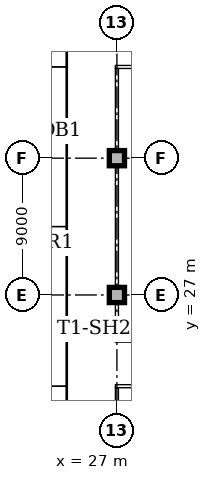
"""IFC4 building model, lengths in metres.
Left out: names, types, materials, properties, quantities, classifications, styles, units other than length and angle.
Written with IfcOpenShell. Run it as: python <this file> out.ifc"""

import sys

from ifc_helpers import new_model, si_unit, direction, frame, frame_2d, origin, origin_2d, place, context, subcontext, project, spatial, rectangle, extrude, element, fill, save


model = new_model("IFC4")
c1 = context("Model", 3, precision=1e-05, world=origin(), true_north=direction((0.0, 1.0)))
c2 = subcontext(c1, "Body", "Model", "MODEL_VIEW")
j1 = project(units=[si_unit("LENGTHUNIT", "METRE"), si_unit("PLANEANGLEUNIT", "RADIAN")], contexts=[c1])
p1 = place(None, origin())
s1 = spatial("IfcSite", under=j1, at=p1, CompositionType="ELEMENT")
p2 = place(p1, origin())
s2 = spatial("IfcBuilding", under=s1, at=p2, CompositionType="ELEMENT")
p3 = place(p2, origin())
s3 = spatial("IfcBuildingStorey", under=s2, at=p3, CompositionType="ELEMENT", Elevation=0.0)
for number, where, z_axis, x_axis in (
    (1, (3.9, 20.4, 0.0), (0.0, 0.0, 1.0), (1.0, 0.0, 0.0)),
    (2, (23.7, 42.6, 0.0), (0.0, 0.0, 1.0), (-1.0, 0.0, 0.0)),
):
    element("IfcWall", number, at=place(p3, frame(where, z_axis=z_axis, x_axis=x_axis)), inside=s3, PredefinedType="SOLIDWALL", context=c2, shape_type="SweptSolid", body=[
        extrude(rectangle(XDim=19.8, YDim=1.2, at=frame_2d((9.9, 0.0))), origin(), (0.0, 0.0, 1.0), 6.0),
    ])
p4 = place(p3, frame((23.1, 21.0, 0.0), z_axis=(0.0, 0.0, 1.0), x_axis=(0.0, 1.0, 0.0)))
e3 = element("IfcWall", 3, at=p4, inside=s3, PredefinedType="SOLIDWALL", context=c2, shape_type="SweptSolid", body=[
    extrude(rectangle(XDim=10.5, YDim=1.2, at=frame_2d((5.25, 0.0))), origin(), (0.0, 0.0, 1.0), 6.0),
])
p5 = place(p4, frame((4.35, 0.0, 0.0)))
e4 = element("IfcOpeningElement", 4, at=p5, cuts=e3, PredefinedType="OPENING", context=c2, shape_type="SweptSolid", body=[
    extrude(rectangle(XDim=1.8, YDim=2.1, at=frame_2d((0.9, 1.05))), frame((0.0, 0.61, 0.0), z_axis=(0.0, -1.0, 0.0), x_axis=(1.0, 0.0, 0.0)), (0.0, 0.0, 1.0), 1.22),
])
p6 = place(p3, frame((23.1, 31.5, 0.0), z_axis=(0.0, 0.0, 1.0), x_axis=(0.0, 1.0, 0.0)))
e5 = element("IfcWall", 5, at=p6, inside=s3, PredefinedType="SOLIDWALL", context=c2, shape_type="SweptSolid", body=[
    extrude(rectangle(XDim=10.5, YDim=1.2, at=frame_2d((5.25, 0.0))), origin(), (0.0, 0.0, 1.0), 6.0),
])
p7 = place(p6, frame((3.15, 0.0, 0.0)))
e6 = element("IfcOpeningElement", 6, at=p7, cuts=e5, PredefinedType="OPENING", context=c2, shape_type="SweptSolid", body=[
    extrude(rectangle(XDim=1.0, YDim=2.1, at=frame_2d((0.5, 1.05))), frame((0.0, 0.61, 0.0), z_axis=(0.0, -1.0, 0.0), x_axis=(1.0, 0.0, 0.0)), (0.0, 0.0, 1.0), 1.22),
])
p8 = place(p6, frame((5.2, 0.0, 0.0)))
e7 = element("IfcOpeningElement", 7, at=p8, cuts=e5, PredefinedType="OPENING", context=c2, shape_type="SweptSolid", body=[
    extrude(rectangle(XDim=1.0, YDim=2.1, at=frame_2d((0.5, 1.05))), frame((0.0, 0.61, 0.0), z_axis=(0.0, -1.0, 0.0), x_axis=(1.0, 0.0, 0.0)), (0.0, 0.0, 1.0), 1.22),
])
for number, where, z_axis, x_axis in (
    (8, (27.0, 27.0, 0.0), (0.0, 0.0, 1.0), (1.0, 0.0, 0.0)),
    (9, (27.0, 36.0, 0.0), (0.0, 0.0, 1.0), (1.0, 0.0, 0.0)),
):
    element("IfcColumn", number, at=place(p3, frame(where, z_axis=z_axis, x_axis=x_axis)), inside=s3, PredefinedType="COLUMN", context=c2, shape_type="SweptSolid", body=[
        extrude(rectangle(XDim=1.0, YDim=1.0, at=origin_2d()), origin(), (0.0, 0.0, 1.0), 5.7),
    ])
p9 = place(p3, frame((26.9, 42.0, 0.0), z_axis=(0.0, 0.0, 1.0), x_axis=(1.0, 0.0, 0.0)))
e10 = element("IfcWall", 10, at=p9, inside=s3, PredefinedType="PARTITIONING", context=c2, shape_type="SweptSolid", body=[
    extrude(rectangle(XDim=3.1, YDim=0.2, at=frame_2d((1.55, 0.0))), origin(), (0.0, 0.0, 1.0), 5.7),
])
for number, where, z_axis, x_axis in (
    (11, (27.0, 18.52, 0.0), (0.0, 0.0, 1.0), (0.0, 1.0, 0.0)),
    (12, (27.0, 24.1, 0.0), (0.0, 0.0, 1.0), (0.0, 1.0, 0.0)),
):
    element("IfcWall", number, at=place(p3, frame(where, z_axis=z_axis, x_axis=x_axis)), inside=s3, PredefinedType="PARTITIONING", context=c2, shape_type="SweptSolid", body=[
        extrude(rectangle(XDim=2.38, YDim=0.2, at=frame_2d((1.19, 0.0))), origin(), (0.0, 0.0, 1.0), 5.7),
    ])
p10 = place(p3, frame((27.0, 27.52, 0.0), z_axis=(0.0, 0.0, 1.0), x_axis=(0.0, 1.0, 0.0)))
e13 = element("IfcWall", 13, at=p10, inside=s3, PredefinedType="PARTITIONING", context=c2, shape_type="SweptSolid", body=[
    extrude(rectangle(XDim=7.96, YDim=0.2, at=frame_2d((3.98, 0.0))), origin(), (0.0, 0.0, 1.0), 5.7),
])
p11 = place(p10, frame((4.98, 0.0, 0.0)))
e14 = element("IfcOpeningElement", 14, at=p11, cuts=e13, PredefinedType="OPENING", context=c2, shape_type="SweptSolid", body=[
    extrude(rectangle(XDim=1.0, YDim=2.1, at=frame_2d((0.5, 1.05))), frame((0.0, 0.11, 0.0), z_axis=(0.0, -1.0, 0.0), x_axis=(1.0, 0.0, 0.0)), (0.0, 0.0, 1.0), 0.22),
])
p12 = place(p3, frame((27.0, 36.52, 0.0), z_axis=(0.0, 0.0, 1.0), x_axis=(0.0, 1.0, 0.0)))
e15 = element("IfcWall", 15, at=p12, inside=s3, PredefinedType="PARTITIONING", context=c2, shape_type="SweptSolid", body=[
    extrude(rectangle(XDim=5.38, YDim=0.2, at=frame_2d((2.69, 0.0))), origin(), (0.0, 0.0, 1.0), 5.7),
])
p13 = place(p3, frame((26.9, 21.0, 0.0), z_axis=(0.0, 0.0, 1.0), x_axis=(1.0, 0.0, 0.0)))
e16 = element("IfcWall", 16, at=p13, inside=s3, PredefinedType="PARTITIONING", context=c2, shape_type="SweptSolid", body=[
    extrude(rectangle(XDim=9.1, YDim=0.2, at=frame_2d((4.55, 0.0))), origin(), (0.0, 0.0, 1.0), 5.7),
])
p14 = place(p3, frame((26.9, 24.0, 0.0), z_axis=(0.0, 0.0, 1.0), x_axis=(1.0, 0.0, 0.0)))
e17 = element("IfcWall", 17, at=p14, inside=s3, PredefinedType="PARTITIONING", context=c2, shape_type="SweptSolid", body=[
    extrude(rectangle(XDim=3.1, YDim=0.2, at=frame_2d((1.55, 0.0))), origin(), (0.0, 0.0, 1.0), 5.7),
])
p15 = place(p11, frame((1.0, 0.0, 0.0), z_axis=(0.0, 0.0, 1.0), x_axis=(-1.0, 0.0, 0.0)))
e18 = element("IfcDoor", 18, at=p15, inside=s3, OperationType="SINGLE_SWING_RIGHT", PredefinedType="DOOR", context=c2, shape_type="SweptSolid", body=[
    extrude(rectangle(XDim=1.0, YDim=2.1, at=frame_2d((0.5, 1.05))), frame((0.0, 0.025, 0.0), z_axis=(0.0, -1.0, 0.0), x_axis=(1.0, 0.0, 0.0)), (0.0, 0.0, 1.0), 0.05),
])
fill(e14, e18)
p16 = place(p5, origin())
e19 = element("IfcDoor", 19, at=p16, inside=s3, OperationType="DOUBLE_DOOR_DOUBLE_SWING", PredefinedType="DOOR", context=c2, shape_type="SweptSolid", body=[
    extrude(rectangle(XDim=1.8, YDim=2.1, at=frame_2d((0.9, 1.05))), frame((0.0, 0.025, 0.0), z_axis=(0.0, -1.0, 0.0), x_axis=(1.0, 0.0, 0.0)), (0.0, 0.0, 1.0), 0.05),
])
fill(e4, e19)
p17 = place(p7, frame((1.0, 0.0, 0.0), z_axis=(0.0, 0.0, 1.0), x_axis=(-1.0, 0.0, 0.0)))
e20 = element("IfcDoor", 20, at=p17, inside=s3, OperationType="SINGLE_SWING_LEFT", PredefinedType="DOOR", context=c2, shape_type="SweptSolid", body=[
    extrude(rectangle(XDim=1.0, YDim=2.1, at=frame_2d((0.5, 1.05))), frame((0.0, 0.025, 0.0), z_axis=(0.0, -1.0, 0.0), x_axis=(1.0, 0.0, 0.0)), (0.0, 0.0, 1.0), 0.05),
])
fill(e6, e20)
p18 = place(p8, frame((1.0, 0.0, 0.0), z_axis=(0.0, 0.0, 1.0), x_axis=(-1.0, 0.0, 0.0)))
e21 = element("IfcDoor", 21, at=p18, inside=s3, OperationType="SINGLE_SWING_RIGHT", PredefinedType="DOOR", context=c2, shape_type="SweptSolid", body=[
    extrude(rectangle(XDim=1.0, YDim=2.1, at=frame_2d((0.5, 1.05))), frame((0.0, 0.025, 0.0), z_axis=(0.0, -1.0, 0.0), x_axis=(1.0, 0.0, 0.0)), (0.0, 0.0, 1.0), 0.05),
])
fill(e7, e21)
save(model, sys.argv[1])
